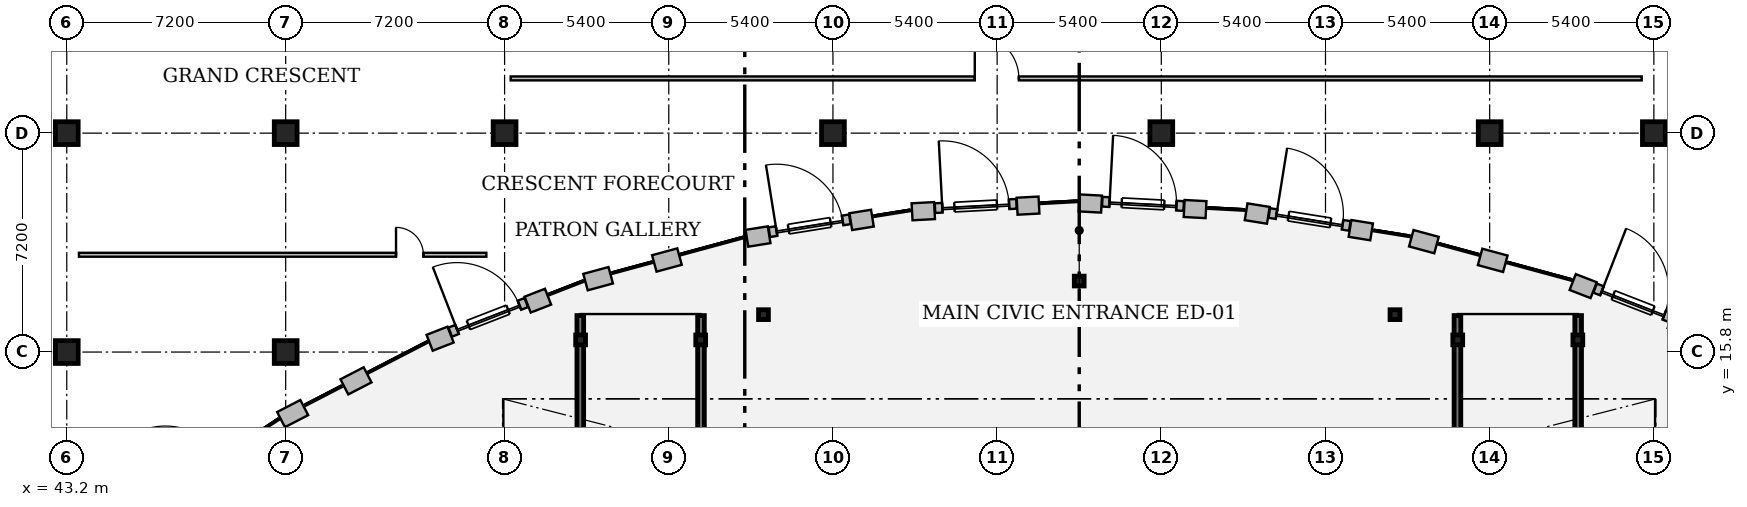
"""IFC4 building model, lengths in metres.
Left out: names, types, materials, properties, quantities, classifications, styles, units other than length and angle.
Written with IfcOpenShell. Run it as: python <this file> out.ifc"""

import sys

from ifc_helpers import new_model, si_unit, direction, frame, frame_2d, origin, origin_2d, place, context, subcontext, project, spatial, rectangle, circle, hollow_circle, extrude, element, fill, save


model = new_model("IFC4")
c1 = context("Model", 3, precision=1e-05, world=origin(), true_north=direction((0.0, 1.0)))
c2 = subcontext(c1, "Body", "Model", "MODEL_VIEW")
j1 = project(units=[si_unit("LENGTHUNIT", "METRE"), si_unit("PLANEANGLEUNIT", "RADIAN")], contexts=[c1])
p1 = place(None, origin())
s1 = spatial("IfcSite", under=j1, at=p1, CompositionType="ELEMENT")
p2 = place(p1, origin())
s2 = spatial("IfcBuilding", under=s1, at=p2, CompositionType="ELEMENT")
p3 = place(p2, origin())
s3 = spatial("IfcBuildingStorey", under=s2, at=p3, CompositionType="ELEMENT", Elevation=0.0)
for number, where, z_axis, x_axis in (
    (1, (68.4, 23.0, 0.0), (0.0, 0.0, 1.0), (1.0, 0.0, 0.0)),
    (2, (79.2, 23.0, 0.0), (0.0, 0.0, 1.0), (1.0, 0.0, 0.0)),
    (3, (90.0, 23.0, 0.0), (0.0, 0.0, 1.0), (1.0, 0.0, 0.0)),
    (4, (95.4, 23.0, 0.0), (0.0, 0.0, 1.0), (1.0, 0.0, 0.0)),
    (5, (43.2, 15.8, 0.0), (0.0, 0.0, 1.0), (1.0, 0.0, 0.0)),
    (6, (43.2, 23.0, 0.0), (0.0, 0.0, 1.0), (1.0, 0.0, 0.0)),
    (7, (50.4, 15.8, 0.0), (0.0, 0.0, 1.0), (1.0, 0.0, 0.0)),
    (8, (50.4, 23.0, 0.0), (0.0, 0.0, 1.0), (1.0, 0.0, 0.0)),
    (9, (57.6, 23.0, 0.0), (0.0, 0.0, 1.0), (1.0, 0.0, 0.0)),
):
    element("IfcColumn", number, at=place(p3, frame(where, z_axis=z_axis, x_axis=x_axis)), inside=s3, PredefinedType="COLUMN", context=c2, shape_type="SweptSolid", body=[
        extrude(circle(Radius=0.375, at=origin_2d()), origin(), (0.0, 0.0, 1.0), 4.8),
    ])
for number, where, z_axis, x_axis in (
    (10, (60.1, 16.2, 0.0), (0.0, 0.0, 1.0), (1.0, 0.0, 0.0)),
    (11, (64.05, 16.2, 0.0), (0.0, 0.0, 1.0), (1.0, 0.0, 0.0)),
    (12, (88.95, 16.2, 0.0), (0.0, 0.0, 1.0), (1.0, 0.0, 0.0)),
    (13, (92.9, 16.2, 0.0), (0.0, 0.0, 1.0), (1.0, 0.0, 0.0)),
):
    element("IfcColumn", number, at=place(p3, frame(where, z_axis=z_axis, x_axis=x_axis)), inside=s3, PredefinedType="COLUMN", context=c2, shape_type="SweptSolid", body=[
        extrude(hollow_circle(Radius=0.162, WallThickness=0.012, at=origin_2d()), origin(), (0.0, 0.0, 1.0), 2.94),
    ])
for number, where, z_axis, x_axis in (
    (14, (60.09, 9.015, 0.0), (0.0, 0.0, 1.0), (0.0, 1.0, 0.0)),
    (15, (64.06, 9.015, 0.0), (0.0, 0.0, 1.0), (0.0, 1.0, 0.0)),
    (16, (88.94, 9.015, 0.0), (0.0, 0.0, 1.0), (0.0, 1.0, 0.0)),
    (17, (92.91, 9.015, 0.0), (0.0, 0.0, 1.0), (0.0, 1.0, 0.0)),
):
    element("IfcWall", number, at=place(p3, frame(where, z_axis=z_axis, x_axis=x_axis)), inside=s3, PredefinedType="SOLIDWALL", context=c2, shape_type="SweptSolid", body=[
        extrude(rectangle(XDim=7.985, YDim=0.22, at=frame_2d((3.993, 0.0))), origin(), (0.0, 0.0, 1.0), 3.02),
    ])
for number, where, z_axis, x_axis in (
    (18, (50.247, 13.579, 0.0), (0.0, 0.0, 1.0), (0.888, 0.459, 0.0)),
    (19, (52.33, 14.656, 0.0), (0.0, 0.0, 1.0), (0.888, 0.459, 0.0)),
):
    element("IfcWall", number, at=place(p3, frame(where, z_axis=z_axis, x_axis=x_axis)), inside=s3, PredefinedType="SOLIDWALL", context=c2, shape_type="SweptSolid", body=[
        extrude(rectangle(XDim=0.86, YDim=0.56, at=frame_2d((0.43, 0.0))), origin(), (0.0, 0.0, 1.0), 4.54),
    ])
p4 = place(p3, frame((55.134, 16.105, 0.0), z_axis=(0.0, 0.0, 1.0), x_axis=(0.931961327096, 0.362557698577, 0.0)))
e20 = element("IfcWall", 20, at=p4, inside=s3, PredefinedType="SOLIDWALL", context=c2, shape_type="SweptSolid", body=[
    extrude(rectangle(XDim=0.74, YDim=0.56, at=frame_2d((0.37, 0.0))), origin(), (0.0, 0.0, 1.0), 4.54),
])
p5 = place(p3, frame((58.359, 17.36, 0.0), z_axis=(0.0, 0.0, 1.0), x_axis=(0.931851856596, 0.362838968908, 0.0)))
e21 = element("IfcWall", 21, at=p5, inside=s3, PredefinedType="SOLIDWALL", context=c2, shape_type="SweptSolid", body=[
    extrude(rectangle(XDim=0.72, YDim=0.56, at=frame_2d((0.36, 0.0))), origin(), (0.0, 0.0, 1.0), 4.54),
])
p6 = place(p3, frame((55.813, 16.455, 0.0), z_axis=(0.0, 0.0, 1.0), x_axis=(0.931953372645, 0.362578144978, 0.0)))
e22 = element("IfcWall", 22, at=p6, inside=s3, PredefinedType="SOLIDWALL", context=c2, shape_type="SweptSolid", body=[
    extrude(rectangle(XDim=2.68, YDim=0.32, at=frame_2d((1.34, 0.0))), origin(), (0.0, 0.0, 1.0), 4.54),
])
p7 = place(p6, frame((0.64, 0.0, 2.58)))
e23 = element("IfcOpeningElement", 23, at=p7, cuts=e22, PredefinedType="OPENING", context=c2, shape_type="SweptSolid", body=[
    extrude(rectangle(XDim=1.4, YDim=1.8, at=frame_2d((0.7, 0.9))), frame((0.0, 0.18, 0.0), z_axis=(0.0, -1.0, 0.0), x_axis=(1.0, 0.0, 0.0)), (0.0, 0.0, 1.0), 0.36),
])
p8 = place(p6, frame((0.24, 0.0, 0.0)))
e24 = element("IfcOpeningElement", 24, at=p8, cuts=e22, PredefinedType="OPENING", context=c2, shape_type="SweptSolid", body=[
    extrude(rectangle(XDim=2.2, YDim=2.5, at=frame_2d((1.1, 1.25))), frame((0.0, 0.18, 0.0), z_axis=(0.0, -1.0, 0.0), x_axis=(1.0, 0.0, 0.0)), (0.0, 0.0, 1.0), 0.36),
])
p9 = place(p3, frame((60.261, 18.1, 0.0), z_axis=(0.0, 0.0, 1.0), x_axis=(0.965071022865, 0.261988398266, 0.0)))
e25 = element("IfcWall", 25, at=p9, inside=s3, PredefinedType="SOLIDWALL", context=c2, shape_type="SweptSolid", body=[
    extrude(rectangle(XDim=0.86, YDim=0.56, at=frame_2d((0.43, 0.0))), origin(), (0.0, 0.0, 1.0), 4.54),
])
p10 = place(p3, frame((62.524, 18.715, 0.0), z_axis=(0.0, 0.0, 1.0), x_axis=(0.965123305847, 0.261795730506, 0.0)))
e26 = element("IfcWall", 26, at=p10, inside=s3, PredefinedType="SOLIDWALL", context=c2, shape_type="SweptSolid", body=[
    extrude(rectangle(XDim=0.86, YDim=0.56, at=frame_2d((0.43, 0.0))), origin(), (0.0, 0.0, 1.0), 4.54),
])
p11 = place(p3, frame((65.57, 19.542, 0.0), z_axis=(0.0, 0.0, 1.0), x_axis=(0.987374648009, 0.158402349948, 0.0)))
e27 = element("IfcWall", 27, at=p11, inside=s3, PredefinedType="SOLIDWALL", context=c2, shape_type="SweptSolid", body=[
    extrude(rectangle(XDim=0.74, YDim=0.56, at=frame_2d((0.37, 0.0))), origin(), (0.0, 0.0, 1.0), 4.54),
])
p12 = place(p3, frame((68.987, 20.09, 0.0), z_axis=(0.0, 0.0, 1.0), x_axis=(0.98738343789, 0.158347549964, 0.0)))
e28 = element("IfcWall", 28, at=p12, inside=s3, PredefinedType="SOLIDWALL", context=c2, shape_type="SweptSolid", body=[
    extrude(rectangle(XDim=0.72, YDim=0.56, at=frame_2d((0.36, 0.0))), origin(), (0.0, 0.0, 1.0), 4.54),
])
p13 = place(p3, frame((66.308, 19.741, 0.0), z_axis=(0.0, 0.0, 1.0), x_axis=(0.987384856389, 0.158338704595, 0.0)))
e29 = element("IfcWall", 29, at=p13, inside=s3, PredefinedType="SOLIDWALL", context=c2, shape_type="SweptSolid", body=[
    extrude(rectangle(XDim=2.68, YDim=0.32, at=frame_2d((1.34, 0.0))), origin(), (0.0, 0.0, 1.0), 4.54),
])
p14 = place(p13, frame((0.64, 0.0, 2.58)))
e30 = element("IfcOpeningElement", 30, at=p14, cuts=e29, PredefinedType="OPENING", context=c2, shape_type="SweptSolid", body=[
    extrude(rectangle(XDim=1.4, YDim=1.8, at=frame_2d((0.7, 0.9))), frame((0.0, 0.18, 0.0), z_axis=(0.0, -1.0, 0.0), x_axis=(1.0, 0.0, 0.0)), (0.0, 0.0, 1.0), 0.36),
])
p15 = place(p13, frame((0.24, 0.0, 0.0)))
e31 = element("IfcOpeningElement", 31, at=p15, cuts=e29, PredefinedType="OPENING", context=c2, shape_type="SweptSolid", body=[
    extrude(rectangle(XDim=2.2, YDim=2.5, at=frame_2d((1.1, 1.25))), frame((0.0, 0.18, 0.0), z_axis=(0.0, -1.0, 0.0), x_axis=(1.0, 0.0, 0.0)), (0.0, 0.0, 1.0), 0.36),
])
p16 = place(p3, frame((71.002, 20.413, 0.0), z_axis=(0.0, 0.0, 1.0), x_axis=(0.998588513738, 0.053112900797, 0.0)))
e32 = element("IfcWall", 32, at=p16, inside=s3, PredefinedType="SOLIDWALL", context=c2, shape_type="SweptSolid", body=[
    extrude(rectangle(XDim=0.74, YDim=0.56, at=frame_2d((0.37, 0.0))), origin(), (0.0, 0.0, 1.0), 4.54),
])
p17 = place(p3, frame((74.457, 20.596, 0.0), z_axis=(0.0, 0.0, 1.0), x_axis=(0.998582006611, 0.05323510188, 0.0)))
e33 = element("IfcWall", 33, at=p17, inside=s3, PredefinedType="SOLIDWALL", context=c2, shape_type="SweptSolid", body=[
    extrude(rectangle(XDim=0.72, YDim=0.56, at=frame_2d((0.36, 0.0))), origin(), (0.0, 0.0, 1.0), 4.54),
])
p18 = place(p3, frame((71.757, 20.533, 0.0), z_axis=(0.0, 0.0, 1.0), x_axis=(0.998598384616, 0.052926989734, 0.0)))
e34 = element("IfcWall", 34, at=p18, inside=s3, PredefinedType="SOLIDWALL", context=c2, shape_type="SweptSolid", body=[
    extrude(rectangle(XDim=2.68, YDim=0.32, at=frame_2d((1.34, 0.0))), origin(), (0.0, 0.0, 1.0), 4.54),
])
p19 = place(p18, frame((0.64, 0.0, 2.58)))
e35 = element("IfcOpeningElement", 35, at=p19, cuts=e34, PredefinedType="OPENING", context=c2, shape_type="SweptSolid", body=[
    extrude(rectangle(XDim=1.4, YDim=1.8, at=frame_2d((0.7, 0.9))), frame((0.0, 0.18, 0.0), z_axis=(0.0, -1.0, 0.0), x_axis=(1.0, 0.0, 0.0)), (0.0, 0.0, 1.0), 0.36),
])
p20 = place(p18, frame((0.24, 0.0, 0.0)))
e36 = element("IfcOpeningElement", 36, at=p20, cuts=e34, PredefinedType="OPENING", context=c2, shape_type="SweptSolid", body=[
    extrude(rectangle(XDim=2.2, YDim=2.5, at=frame_2d((1.1, 1.25))), frame((0.0, 0.18, 0.0), z_axis=(0.0, -1.0, 0.0), x_axis=(1.0, 0.0, 0.0)), (0.0, 0.0, 1.0), 0.36),
])
p21 = place(p3, frame((76.496, 20.705, 0.0), z_axis=(0.0, 0.0, 1.0), x_axis=(0.99860503714, -0.052801323841, 0.0)))
e37 = element("IfcWall", 37, at=p21, inside=s3, PredefinedType="SOLIDWALL", context=c2, shape_type="SweptSolid", body=[
    extrude(rectangle(XDim=0.74, YDim=0.56, at=frame_2d((0.37, 0.0))), origin(), (0.0, 0.0, 1.0), 4.54),
])
p22 = place(p3, frame((79.951, 20.522, 0.0), z_axis=(0.0, 0.0, 1.0), x_axis=(0.998599974898, -0.052896976599, 0.0)))
e38 = element("IfcWall", 38, at=p22, inside=s3, PredefinedType="SOLIDWALL", context=c2, shape_type="SweptSolid", body=[
    extrude(rectangle(XDim=0.72, YDim=0.56, at=frame_2d((0.36, 0.0))), origin(), (0.0, 0.0, 1.0), 4.54),
])
p23 = place(p3, frame((77.259, 20.745, 0.0), z_axis=(0.0, 0.0, 1.0), x_axis=(0.998598639766, -0.052922175472, 0.0)))
e39 = element("IfcWall", 39, at=p23, inside=s3, PredefinedType="SOLIDWALL", context=c2, shape_type="SweptSolid", body=[
    extrude(rectangle(XDim=2.68, YDim=0.32, at=frame_2d((1.34, 0.0))), origin(), (0.0, 0.0, 1.0), 4.54),
])
p24 = place(p23, frame((0.64, 0.0, 2.58)))
e40 = element("IfcOpeningElement", 40, at=p24, cuts=e39, PredefinedType="OPENING", context=c2, shape_type="SweptSolid", body=[
    extrude(rectangle(XDim=1.4, YDim=1.8, at=frame_2d((0.7, 0.9))), frame((0.0, 0.18, 0.0), z_axis=(0.0, -1.0, 0.0), x_axis=(1.0, 0.0, 0.0)), (0.0, 0.0, 1.0), 0.36),
])
p25 = place(p23, frame((0.24, 0.0, 0.0)))
e41 = element("IfcOpeningElement", 41, at=p25, cuts=e39, PredefinedType="OPENING", context=c2, shape_type="SweptSolid", body=[
    extrude(rectangle(XDim=2.2, YDim=2.5, at=frame_2d((1.1, 1.25))), frame((0.0, 0.18, 0.0), z_axis=(0.0, -1.0, 0.0), x_axis=(1.0, 0.0, 0.0)), (0.0, 0.0, 1.0), 0.36),
])
p26 = place(p3, frame((81.99, 20.414, 0.0), z_axis=(0.0, 0.0, 1.0), x_axis=(0.987382924217, -0.158350752965, 0.0)))
e42 = element("IfcWall", 42, at=p26, inside=s3, PredefinedType="SOLIDWALL", context=c2, shape_type="SweptSolid", body=[
    extrude(rectangle(XDim=0.74, YDim=0.56, at=frame_2d((0.37, 0.0))), origin(), (0.0, 0.0, 1.0), 4.54),
])
p27 = place(p3, frame((85.406, 19.866, 0.0), z_axis=(0.0, 0.0, 1.0), x_axis=(0.98738343789, -0.158347549964, 0.0)))
e43 = element("IfcWall", 43, at=p27, inside=s3, PredefinedType="SOLIDWALL", context=c2, shape_type="SweptSolid", body=[
    extrude(rectangle(XDim=0.72, YDim=0.56, at=frame_2d((0.36, 0.0))), origin(), (0.0, 0.0, 1.0), 4.54),
])
p28 = place(p3, frame((82.752, 20.373, 0.0), z_axis=(0.0, 0.0, 1.0), x_axis=(0.987387140162, -0.158324462552, 0.0)))
e44 = element("IfcWall", 44, at=p28, inside=s3, PredefinedType="SOLIDWALL", context=c2, shape_type="SweptSolid", body=[
    extrude(rectangle(XDim=2.68, YDim=0.32, at=frame_2d((1.34, 0.0))), origin(), (0.0, 0.0, 1.0), 4.54),
])
p29 = place(p28, frame((0.64, 0.0, 2.58)))
e45 = element("IfcOpeningElement", 45, at=p29, cuts=e44, PredefinedType="OPENING", context=c2, shape_type="SweptSolid", body=[
    extrude(rectangle(XDim=1.4, YDim=1.8, at=frame_2d((0.7, 0.9))), frame((0.0, 0.18, 0.0), z_axis=(0.0, -1.0, 0.0), x_axis=(1.0, 0.0, 0.0)), (0.0, 0.0, 1.0), 0.36),
])
p30 = place(p28, frame((0.24, 0.0, 0.0)))
e46 = element("IfcOpeningElement", 46, at=p30, cuts=e44, PredefinedType="OPENING", context=c2, shape_type="SweptSolid", body=[
    extrude(rectangle(XDim=2.2, YDim=2.5, at=frame_2d((1.1, 1.25))), frame((0.0, 0.18, 0.0), z_axis=(0.0, -1.0, 0.0), x_axis=(1.0, 0.0, 0.0)), (0.0, 0.0, 1.0), 0.36),
])
p31 = place(p3, frame((87.421, 19.543, 0.0), z_axis=(0.0, 0.0, 1.0), x_axis=(0.965071022865, -0.261988398266, 0.0)))
e47 = element("IfcWall", 47, at=p31, inside=s3, PredefinedType="SOLIDWALL", context=c2, shape_type="SweptSolid", body=[
    extrude(rectangle(XDim=0.86, YDim=0.56, at=frame_2d((0.43, 0.0))), origin(), (0.0, 0.0, 1.0), 4.54),
])
p32 = place(p3, frame((89.685, 18.929, 0.0), z_axis=(0.0, 0.0, 1.0), x_axis=(0.965123305847, -0.261795730506, 0.0)))
e48 = element("IfcWall", 48, at=p32, inside=s3, PredefinedType="SOLIDWALL", context=c2, shape_type="SweptSolid", body=[
    extrude(rectangle(XDim=0.86, YDim=0.56, at=frame_2d((0.43, 0.0))), origin(), (0.0, 0.0, 1.0), 4.54),
])
p33 = place(p3, frame((92.731, 18.103, 0.0), z_axis=(0.0, 0.0, 1.0), x_axis=(0.932029444391, -0.362382553095, 0.0)))
e49 = element("IfcWall", 49, at=p33, inside=s3, PredefinedType="SOLIDWALL", context=c2, shape_type="SweptSolid", body=[
    extrude(rectangle(XDim=0.74, YDim=0.56, at=frame_2d((0.37, 0.0))), origin(), (0.0, 0.0, 1.0), 4.54),
])
p34 = place(p3, frame((95.956, 16.848, 0.0), z_axis=(0.0, 0.0, 1.0), x_axis=(0.931966478623, -0.362544456204, 0.0)))
e50 = element("IfcWall", 50, at=p34, inside=s3, PredefinedType="SOLIDWALL", context=c2, shape_type="SweptSolid", body=[
    extrude(rectangle(XDim=0.72, YDim=0.56, at=frame_2d((0.36, 0.0))), origin(), (0.0, 0.0, 1.0), 4.54),
])
p35 = place(p3, frame((93.468, 17.902, 0.0), z_axis=(0.0, 0.0, 1.0), x_axis=(0.931984153545, -0.362499017298, 0.0)))
e51 = element("IfcWall", 51, at=p35, inside=s3, PredefinedType="SOLIDWALL", context=c2, shape_type="SweptSolid", body=[
    extrude(rectangle(XDim=2.68, YDim=0.32, at=frame_2d((1.34, 0.0))), origin(), (0.0, 0.0, 1.0), 4.54),
])
p36 = place(p35, frame((0.64, 0.0, 2.58)))
e52 = element("IfcOpeningElement", 52, at=p36, cuts=e51, PredefinedType="OPENING", context=c2, shape_type="SweptSolid", body=[
    extrude(rectangle(XDim=1.4, YDim=1.8, at=frame_2d((0.7, 0.9))), frame((0.0, 0.18, 0.0), z_axis=(0.0, -1.0, 0.0), x_axis=(1.0, 0.0, 0.0)), (0.0, 0.0, 1.0), 0.36),
])
p37 = place(p35, frame((0.24, 0.0, 0.0)))
e53 = element("IfcOpeningElement", 53, at=p37, cuts=e51, PredefinedType="OPENING", context=c2, shape_type="SweptSolid", body=[
    extrude(rectangle(XDim=2.2, YDim=2.5, at=frame_2d((1.1, 1.25))), frame((0.0, 0.18, 0.0), z_axis=(0.0, -1.0, 0.0), x_axis=(1.0, 0.0, 0.0)), (0.0, 0.0, 1.0), 0.36),
])
for number, where, z_axis, x_axis in (
    (54, (66.115, 17.03, 0.0), (0.0, 0.0, 1.0), (1.0, 0.0, 0.0)),
    (55, (76.5, 18.135, 0.0), (0.0, 0.0, 1.0), (1.0, 0.0, 0.0)),
    (56, (86.885, 17.03, 0.0), (0.0, 0.0, 1.0), (1.0, 0.0, 0.0)),
):
    element("IfcColumn", number, at=place(p3, frame(where, z_axis=z_axis, x_axis=x_axis)), inside=s3, PredefinedType="COLUMN", context=c2, shape_type="SweptSolid", body=[
        extrude(hollow_circle(Radius=0.162, WallThickness=0.012, at=origin_2d()), origin(), (0.0, 0.0, 1.0), 4.44),
    ])
p38 = place(p3, frame((43.6, 19.0, 0.0), z_axis=(0.0, 0.0, 1.0), x_axis=(1.0, 0.0, 0.0)))
e57 = element("IfcWall", 57, at=p38, inside=s3, PredefinedType="PARTITIONING", context=c2, shape_type="SweptSolid", body=[
    extrude(rectangle(XDim=13.4, YDim=0.13, at=frame_2d((6.7, 0.0))), origin(), (0.0, 0.0, 1.0), 4.54),
])
p39 = place(p38, frame((10.429, 0.0, 0.0)))
e58 = element("IfcOpeningElement", 58, at=p39, cuts=e57, PredefinedType="OPENING", context=c2, shape_type="SweptSolid", body=[
    extrude(rectangle(XDim=0.9, YDim=2.15, at=frame_2d((0.45, 1.075))), frame((0.0, 0.085, 0.0), z_axis=(0.0, -1.0, 0.0), x_axis=(1.0, 0.0, 0.0)), (0.0, 0.0, 1.0), 0.17),
])
p40 = place(p3, frame((57.8, 24.8, 0.0), z_axis=(0.0, 0.0, 1.0), x_axis=(1.0, 0.0, 0.0)))
e59 = element("IfcWall", 59, at=p40, inside=s3, PredefinedType="PARTITIONING", context=c2, shape_type="SweptSolid", body=[
    extrude(rectangle(XDim=37.2, YDim=0.13, at=frame_2d((18.6, 0.0))), origin(), (0.0, 0.0, 1.0), 4.54),
])
p41 = place(p40, frame((15.265, 0.0, 0.0)))
e60 = element("IfcOpeningElement", 60, at=p41, cuts=e59, PredefinedType="OPENING", context=c2, shape_type="SweptSolid", body=[
    extrude(rectangle(XDim=1.45, YDim=2.2, at=frame_2d((0.725, 1.1))), frame((0.0, 0.085, 0.0), z_axis=(0.0, -1.0, 0.0), x_axis=(1.0, 0.0, 0.0)), (0.0, 0.0, 1.0), 0.17),
])
p42 = place(p7, origin())
e61 = element("IfcWindow", 61, at=p42, inside=s3, PartitioningType="SINGLE_PANEL", PredefinedType="WINDOW", context=c2, shape_type="SweptSolid", body=[
    extrude(rectangle(XDim=1.4, YDim=1.8, at=frame_2d((0.7, 0.9))), frame((0.0, 0.03, 0.0), z_axis=(0.0, -1.0, 0.0), x_axis=(1.0, 0.0, 0.0)), (0.0, 0.0, 1.0), 0.06),
])
fill(e23, e61)
p43 = place(p8, origin())
e62 = element("IfcDoor", 62, at=p43, inside=s3, OperationType="SINGLE_SWING_LEFT", PredefinedType="DOOR", context=c2, shape_type="SweptSolid", body=[
    extrude(rectangle(XDim=2.2, YDim=2.5, at=frame_2d((1.1, 1.25))), frame((0.0, 0.025, 0.0), z_axis=(0.0, -1.0, 0.0), x_axis=(1.0, 0.0, 0.0)), (0.0, 0.0, 1.0), 0.05),
])
fill(e24, e62)
p44 = place(p14, origin())
e63 = element("IfcWindow", 63, at=p44, inside=s3, PartitioningType="SINGLE_PANEL", PredefinedType="WINDOW", context=c2, shape_type="SweptSolid", body=[
    extrude(rectangle(XDim=1.4, YDim=1.8, at=frame_2d((0.7, 0.9))), frame((0.0, 0.03, 0.0), z_axis=(0.0, -1.0, 0.0), x_axis=(1.0, 0.0, 0.0)), (0.0, 0.0, 1.0), 0.06),
])
fill(e30, e63)
p45 = place(p15, origin())
e64 = element("IfcDoor", 64, at=p45, inside=s3, OperationType="SINGLE_SWING_LEFT", PredefinedType="DOOR", context=c2, shape_type="SweptSolid", body=[
    extrude(rectangle(XDim=2.2, YDim=2.5, at=frame_2d((1.1, 1.25))), frame((0.0, 0.025, 0.0), z_axis=(0.0, -1.0, 0.0), x_axis=(1.0, 0.0, 0.0)), (0.0, 0.0, 1.0), 0.05),
])
fill(e31, e64)
p46 = place(p19, origin())
e65 = element("IfcWindow", 65, at=p46, inside=s3, PartitioningType="SINGLE_PANEL", PredefinedType="WINDOW", context=c2, shape_type="SweptSolid", body=[
    extrude(rectangle(XDim=1.4, YDim=1.8, at=frame_2d((0.7, 0.9))), frame((0.0, 0.03, 0.0), z_axis=(0.0, -1.0, 0.0), x_axis=(1.0, 0.0, 0.0)), (0.0, 0.0, 1.0), 0.06),
])
fill(e35, e65)
p47 = place(p20, origin())
e66 = element("IfcDoor", 66, at=p47, inside=s3, OperationType="SINGLE_SWING_LEFT", PredefinedType="DOOR", context=c2, shape_type="SweptSolid", body=[
    extrude(rectangle(XDim=2.2, YDim=2.5, at=frame_2d((1.1, 1.25))), frame((0.0, 0.025, 0.0), z_axis=(0.0, -1.0, 0.0), x_axis=(1.0, 0.0, 0.0)), (0.0, 0.0, 1.0), 0.05),
])
fill(e36, e66)
p48 = place(p24, origin())
e67 = element("IfcWindow", 67, at=p48, inside=s3, PartitioningType="SINGLE_PANEL", PredefinedType="WINDOW", context=c2, shape_type="SweptSolid", body=[
    extrude(rectangle(XDim=1.4, YDim=1.8, at=frame_2d((0.7, 0.9))), frame((0.0, 0.03, 0.0), z_axis=(0.0, -1.0, 0.0), x_axis=(1.0, 0.0, 0.0)), (0.0, 0.0, 1.0), 0.06),
])
fill(e40, e67)
p49 = place(p25, origin())
e68 = element("IfcDoor", 68, at=p49, inside=s3, OperationType="SINGLE_SWING_LEFT", PredefinedType="DOOR", context=c2, shape_type="SweptSolid", body=[
    extrude(rectangle(XDim=2.2, YDim=2.5, at=frame_2d((1.1, 1.25))), frame((0.0, 0.025, 0.0), z_axis=(0.0, -1.0, 0.0), x_axis=(1.0, 0.0, 0.0)), (0.0, 0.0, 1.0), 0.05),
])
fill(e41, e68)
p50 = place(p29, origin())
e69 = element("IfcWindow", 69, at=p50, inside=s3, PartitioningType="SINGLE_PANEL", PredefinedType="WINDOW", context=c2, shape_type="SweptSolid", body=[
    extrude(rectangle(XDim=1.4, YDim=1.8, at=frame_2d((0.7, 0.9))), frame((0.0, 0.03, 0.0), z_axis=(0.0, -1.0, 0.0), x_axis=(1.0, 0.0, 0.0)), (0.0, 0.0, 1.0), 0.06),
])
fill(e45, e69)
p51 = place(p30, origin())
e70 = element("IfcDoor", 70, at=p51, inside=s3, OperationType="SINGLE_SWING_LEFT", PredefinedType="DOOR", context=c2, shape_type="SweptSolid", body=[
    extrude(rectangle(XDim=2.2, YDim=2.5, at=frame_2d((1.1, 1.25))), frame((0.0, 0.025, 0.0), z_axis=(0.0, -1.0, 0.0), x_axis=(1.0, 0.0, 0.0)), (0.0, 0.0, 1.0), 0.05),
])
fill(e46, e70)
p52 = place(p36, origin())
e71 = element("IfcWindow", 71, at=p52, inside=s3, PartitioningType="SINGLE_PANEL", PredefinedType="WINDOW", context=c2, shape_type="SweptSolid", body=[
    extrude(rectangle(XDim=1.4, YDim=1.8, at=frame_2d((0.7, 0.9))), frame((0.0, 0.03, 0.0), z_axis=(0.0, -1.0, 0.0), x_axis=(1.0, 0.0, 0.0)), (0.0, 0.0, 1.0), 0.06),
])
fill(e52, e71)
p53 = place(p37, origin())
e72 = element("IfcDoor", 72, at=p53, inside=s3, OperationType="SINGLE_SWING_LEFT", PredefinedType="DOOR", context=c2, shape_type="SweptSolid", body=[
    extrude(rectangle(XDim=2.2, YDim=2.5, at=frame_2d((1.1, 1.25))), frame((0.0, 0.025, 0.0), z_axis=(0.0, -1.0, 0.0), x_axis=(1.0, 0.0, 0.0)), (0.0, 0.0, 1.0), 0.05),
])
fill(e53, e72)
p54 = place(p39, origin())
e73 = element("IfcDoor", 73, at=p54, inside=s3, OperationType="SINGLE_SWING_LEFT", PredefinedType="DOOR", context=c2, shape_type="SweptSolid", body=[
    extrude(rectangle(XDim=0.9, YDim=2.15, at=frame_2d((0.45, 1.075))), frame((0.0, 0.025, 0.0), z_axis=(0.0, -1.0, 0.0), x_axis=(1.0, 0.0, 0.0)), (0.0, 0.0, 1.0), 0.05),
])
fill(e58, e73)
p55 = place(p41, origin())
e74 = element("IfcDoor", 74, at=p55, inside=s3, OperationType="DOUBLE_DOOR_SINGLE_SWING", PredefinedType="DOOR", context=c2, shape_type="SweptSolid", body=[
    extrude(rectangle(XDim=1.45, YDim=2.2, at=frame_2d((0.725, 1.1))), frame((0.0, 0.025, 0.0), z_axis=(0.0, -1.0, 0.0), x_axis=(1.0, 0.0, 0.0)), (0.0, 0.0, 1.0), 0.05),
])
fill(e60, e74)
save(model, sys.argv[1])
